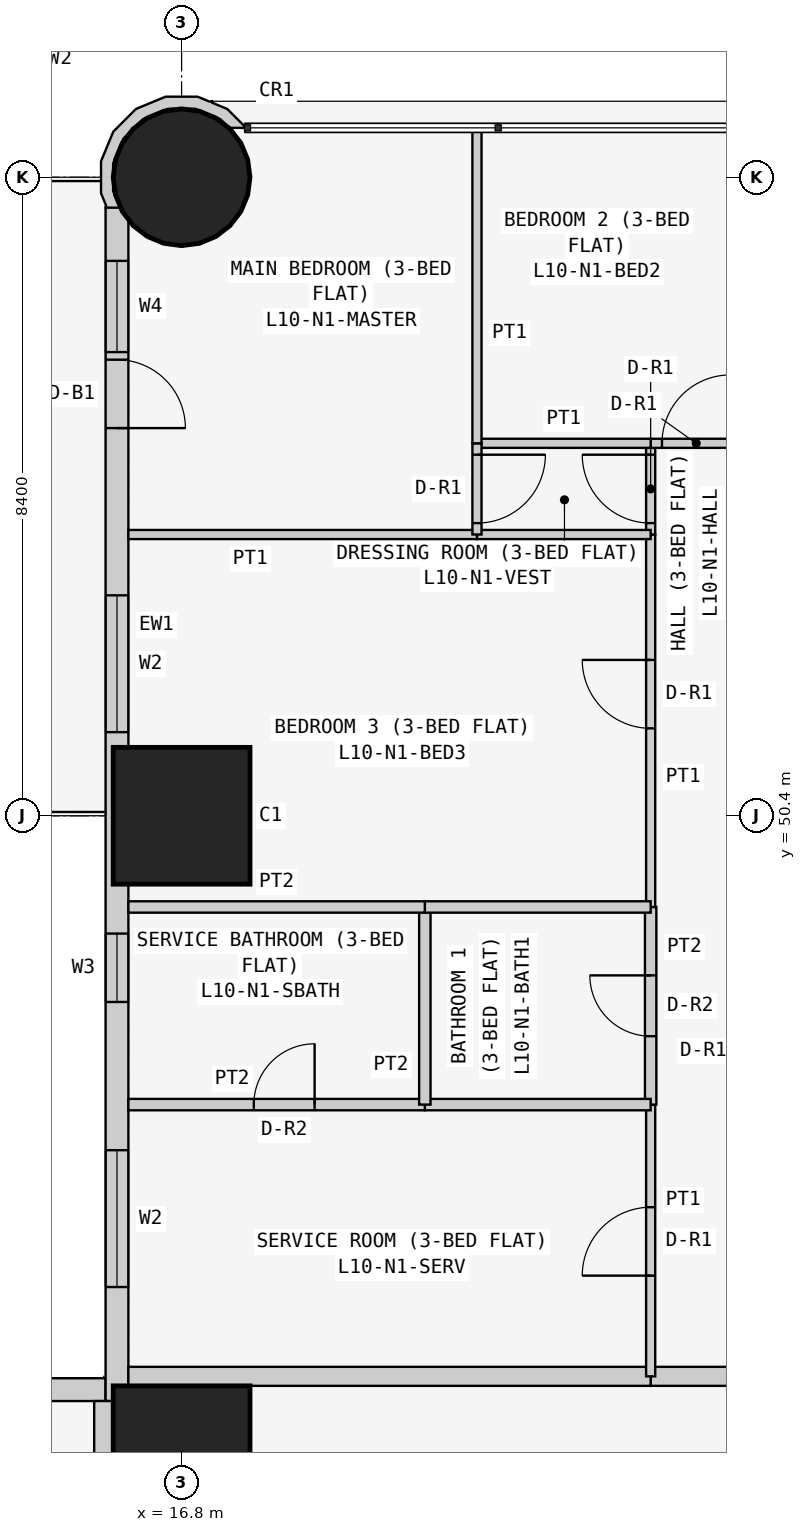
"""IFC4 building model, lengths in metres.
Left out: names, types, materials, properties, quantities, classifications, styles, units other than length and angle.
Written with IfcOpenShell. Run it as: python <this file> out.ifc"""

import sys

from ifc_helpers import new_model, si_unit, direction, frame, frame_2d, origin, origin_2d, place, context, subcontext, project, spatial, polyline, rectangle, circle, outline, extrude, element, fill, save


model = new_model("IFC4")
c1 = context("Model", 3, precision=1e-05, world=origin(), true_north=direction((0.0, 1.0)))
c2 = subcontext(c1, "Body", "Model", "MODEL_VIEW")
j1 = project(units=[si_unit("LENGTHUNIT", "METRE"), si_unit("PLANEANGLEUNIT", "RADIAN")], contexts=[c1])
p1 = place(None, origin())
s1 = spatial("IfcSite", under=j1, at=p1, CompositionType="ELEMENT")
p2 = place(p1, origin())
s2 = spatial("IfcBuilding", under=s1, at=p2, CompositionType="ELEMENT")
p3 = place(p2, frame((0.0, 0.0, 45.3)))
s3 = spatial("IfcBuildingStorey", under=s2, at=p3, CompositionType="ELEMENT", Elevation=45.3)
for number, where, z_axis, x_axis in (
    (1, (16.8, 42.0, 0.0), (0.0, 0.0, 1.0), (1.0, 0.0, 0.0)),
    (2, (16.8, 50.4, 0.0), (0.0, 0.0, 1.0), (1.0, 0.0, 0.0)),
):
    element("IfcColumn", number, at=place(p3, frame(where, z_axis=z_axis, x_axis=x_axis)), inside=s3, PredefinedType="COLUMN", context=c2, shape_type="SweptSolid", body=[
        extrude(rectangle(XDim=1.8, YDim=1.8, at=origin_2d()), origin(), (0.0, 0.0, 1.0), 3.6),
    ])
p4 = place(p3, frame((16.8, 58.8, 0.0), z_axis=(0.0, 0.0, 1.0), x_axis=(1.0, 0.0, 0.0)))
e3 = element("IfcColumn", 3, at=p4, inside=s3, PredefinedType="COLUMN", context=c2, shape_type="SweptSolid", body=[
    extrude(circle(Radius=0.9, at=origin_2d()), origin(), (0.0, 0.0, 1.0), 3.6),
])
p5 = place(p3, frame((15.8, 42.85, 0.0), z_axis=(0.0, 0.0, 1.0), x_axis=(-1.0, 0.0, 0.0)))
e4 = element("IfcWall", 4, at=p5, inside=s3, PredefinedType="SOLIDWALL", context=c2, shape_type="SweptSolid", body=[
    extrude(rectangle(XDim=15.4, YDim=0.3, at=frame_2d((7.7, 0.0))), origin(), (0.0, 0.0, 1.0), 3.45),
])
p6 = place(p5, frame((1.2, 0.0, 0.9)))
e5 = element("IfcOpeningElement", 5, at=p6, cuts=e4, PredefinedType="OPENING", context=c2, shape_type="SweptSolid", body=[
    extrude(rectangle(XDim=1.8, YDim=1.5, at=frame_2d((0.9, 0.75))), frame((0.0, 0.16, 0.0), z_axis=(0.0, -1.0, 0.0), x_axis=(1.0, 0.0, 0.0)), (0.0, 0.0, 1.0), 0.32),
])
p7 = place(p5, frame((4.95, 0.0, 1.5)))
e6 = element("IfcOpeningElement", 6, at=p7, cuts=e4, PredefinedType="OPENING", context=c2, shape_type="SweptSolid", body=[
    extrude(rectangle(XDim=0.9, YDim=0.7, at=frame_2d((0.45, 0.35))), frame((0.0, 0.16, 0.0), z_axis=(0.0, -1.0, 0.0), x_axis=(1.0, 0.0, 0.0)), (0.0, 0.0, 1.0), 0.32),
])
p8 = place(p5, frame((8.5, 0.0, 0.9)))
e7 = element("IfcOpeningElement", 7, at=p8, cuts=e4, PredefinedType="OPENING", context=c2, shape_type="SweptSolid", body=[
    extrude(rectangle(XDim=1.8, YDim=1.5, at=frame_2d((0.9, 0.75))), frame((0.0, 0.16, 0.0), z_axis=(0.0, -1.0, 0.0), x_axis=(1.0, 0.0, 0.0)), (0.0, 0.0, 1.0), 0.32),
])
p9 = place(p5, frame((12.5, 0.0, 0.0)))
e8 = element("IfcOpeningElement", 8, at=p9, cuts=e4, PredefinedType="OPENING", context=c2, shape_type="SweptSolid", body=[
    extrude(rectangle(XDim=0.9, YDim=2.4, at=frame_2d((0.45, 1.2))), frame((0.0, 0.16, 0.0), z_axis=(0.0, -1.0, 0.0), x_axis=(1.0, 0.0, 0.0)), (0.0, 0.0, 1.0), 0.32),
])
p10 = place(p5, frame((13.5, 0.0, 0.9)))
e9 = element("IfcOpeningElement", 9, at=p10, cuts=e4, PredefinedType="OPENING", context=c2, shape_type="SweptSolid", body=[
    extrude(rectangle(XDim=1.2, YDim=1.5, at=frame_2d((0.6, 0.75))), frame((0.0, 0.16, 0.0), z_axis=(0.0, -1.0, 0.0), x_axis=(1.0, 0.0, 0.0)), (0.0, 0.0, 1.0), 0.32),
])
p11 = place(p3, frame((15.95, 58.4, 0.0), z_axis=(0.0, 0.0, 1.0), x_axis=(0.0, -1.0, 0.0)))
e10 = element("IfcWall", 10, at=p11, inside=s3, PredefinedType="SOLIDWALL", context=c2, shape_type="SweptSolid", body=[
    extrude(rectangle(XDim=15.7, YDim=0.3, at=frame_2d((7.85, 0.0))), origin(), (0.0, 0.0, 1.0), 3.45),
])
p12 = place(p11, frame((12.4, 0.0, 0.9)))
e11 = element("IfcOpeningElement", 11, at=p12, cuts=e10, PredefinedType="OPENING", context=c2, shape_type="SweptSolid", body=[
    extrude(rectangle(XDim=1.8, YDim=1.5, at=frame_2d((0.9, 0.75))), frame((0.0, 0.16, 0.0), z_axis=(0.0, -1.0, 0.0), x_axis=(1.0, 0.0, 0.0)), (0.0, 0.0, 1.0), 0.32),
])
p13 = place(p11, frame((9.55, 0.0, 1.5)))
e12 = element("IfcOpeningElement", 12, at=p13, cuts=e10, PredefinedType="OPENING", context=c2, shape_type="SweptSolid", body=[
    extrude(rectangle(XDim=0.9, YDim=0.7, at=frame_2d((0.45, 0.35))), frame((0.0, 0.16, 0.0), z_axis=(0.0, -1.0, 0.0), x_axis=(1.0, 0.0, 0.0)), (0.0, 0.0, 1.0), 0.32),
])
p14 = place(p11, frame((5.1, 0.0, 0.9)))
e13 = element("IfcOpeningElement", 13, at=p14, cuts=e10, PredefinedType="OPENING", context=c2, shape_type="SweptSolid", body=[
    extrude(rectangle(XDim=1.8, YDim=1.5, at=frame_2d((0.9, 0.75))), frame((0.0, 0.16, 0.0), z_axis=(0.0, -1.0, 0.0), x_axis=(1.0, 0.0, 0.0)), (0.0, 0.0, 1.0), 0.32),
])
p15 = place(p11, frame((2.0, 0.0, 0.0)))
e14 = element("IfcOpeningElement", 14, at=p15, cuts=e10, PredefinedType="OPENING", context=c2, shape_type="SweptSolid", body=[
    extrude(rectangle(XDim=0.9, YDim=2.4, at=frame_2d((0.45, 1.2))), frame((0.0, 0.16, 0.0), z_axis=(0.0, -1.0, 0.0), x_axis=(1.0, 0.0, 0.0)), (0.0, 0.0, 1.0), 0.32),
])
p16 = place(p11, frame((0.7, 0.0, 0.9)))
e15 = element("IfcOpeningElement", 15, at=p16, cuts=e10, PredefinedType="OPENING", context=c2, shape_type="SweptSolid", body=[
    extrude(rectangle(XDim=1.2, YDim=1.5, at=frame_2d((0.6, 0.75))), frame((0.0, 0.16, 0.0), z_axis=(0.0, -1.0, 0.0), x_axis=(1.0, 0.0, 0.0)), (0.0, 0.0, 1.0), 0.32),
])
p17 = place(p3, frame((17.567, 59.411, 0.0), z_axis=(0.0, 0.0, 1.0), x_axis=(-0.377204953059, 0.926129809145, 0.0)))
e16 = element("IfcWall", 16, at=p17, inside=s3, PredefinedType="SOLIDWALL", context=c2, shape_type="SweptSolid", body=[
    extrude(outline(polyline([(-0.27, 2.017), (-0.37, 1.841), (-0.102, 1.842), (0.23, 1.707), (0.484, 1.455), (0.624, 1.125), (0.626, 0.766), (0.491, 0.434), (0.239, 0.18), (0.09, 0.117), (0.011, -0.078), (0.024, -0.083), (0.329, 0.045), (0.48, 0.198), (0.499, 0.193), (0.508, 0.225), (0.626, 0.345), (0.785, 0.736), (0.782, 1.157), (0.619, 1.546), (0.319, 1.842), (-0.072, 2.002), (-0.24, 2.0), (-0.27, 2.017)])), origin(), (0.0, 0.0, 1.0), 3.45),
])
p18 = place(p3, frame((22.971, 43.025, 0.0), z_axis=(0.0, 0.0, 1.0), x_axis=(1.0, 0.0, 0.0)))
e17 = element("IfcWall", 17, at=p18, inside=s3, PredefinedType="PARTITIONING", context=c2, shape_type="SweptSolid", body=[
    extrude(rectangle(XDim=1.2, YDim=0.25, at=frame_2d((0.6, 0.0))), origin(), (0.0, 0.0, 1.0), 3.45),
])
p19 = place(p3, frame((16.1, 43.025, 0.0), z_axis=(0.0, 0.0, 1.0), x_axis=(1.0, 0.0, 0.0)))
e18 = element("IfcWall", 18, at=p19, inside=s3, PredefinedType="PARTITIONING", context=c2, shape_type="SweptSolid", body=[
    extrude(rectangle(XDim=6.871, YDim=0.25, at=frame_2d((3.436, 0.0))), origin(), (0.0, 0.0, 1.0), 3.45),
])
p20 = place(p3, frame((15.775, 36.229, 0.0), z_axis=(0.0, 0.0, 1.0), x_axis=(0.0, 1.0, 0.0)))
e19 = element("IfcWall", 19, at=p20, inside=s3, PredefinedType="PARTITIONING", context=c2, shape_type="SweptSolid", body=[
    extrude(rectangle(XDim=6.471, YDim=0.25, at=frame_2d((3.235, 0.0))), origin(), (0.0, 0.0, 1.0), 3.45),
])
p21 = place(p3, frame((22.971, 46.6, 0.0), z_axis=(0.0, 0.0, 1.0), x_axis=(0.0, -1.0, 0.0)))
e20 = element("IfcWall", 20, at=p21, inside=s3, PredefinedType="PARTITIONING", context=c2, shape_type="SweptSolid", body=[
    extrude(rectangle(XDim=3.575, YDim=0.12, at=frame_2d((1.788, 0.0))), origin(), (0.0, 0.0, 1.0), 3.45),
])
p22 = place(p21, frame((1.35, 0.0, 0.0)))
e21 = element("IfcOpeningElement", 21, at=p22, cuts=e20, PredefinedType="OPENING", context=c2, shape_type="SweptSolid", body=[
    extrude(rectangle(XDim=0.9, YDim=2.1, at=frame_2d((0.45, 1.05))), frame((0.0, 0.07, 0.0), z_axis=(0.0, -1.0, 0.0), x_axis=(1.0, 0.0, 0.0)), (0.0, 0.0, 1.0), 0.14),
])
p23 = place(p3, frame((22.971, 49.2, 0.0), z_axis=(0.0, 0.0, 1.0), x_axis=(0.0, -1.0, 0.0)))
e22 = element("IfcWall", 22, at=p23, inside=s3, PredefinedType="PARTITIONING", context=c2, shape_type="SweptSolid", body=[
    extrude(rectangle(XDim=2.6, YDim=0.15, at=frame_2d((1.3, 0.0))), origin(), (0.0, 0.0, 1.0), 3.45),
])
p24 = place(p23, frame((0.9, 0.0, 0.0)))
e23 = element("IfcOpeningElement", 23, at=p24, cuts=e22, PredefinedType="OPENING", context=c2, shape_type="SweptSolid", body=[
    extrude(rectangle(XDim=0.8, YDim=2.1, at=frame_2d((0.4, 1.05))), frame((0.0, 0.085, 0.0), z_axis=(0.0, -1.0, 0.0), x_axis=(1.0, 0.0, 0.0)), (0.0, 0.0, 1.0), 0.17),
])
p25 = place(p3, frame((22.971, 54.1, 0.0), z_axis=(0.0, 0.0, 1.0), x_axis=(0.0, -1.0, 0.0)))
e24 = element("IfcWall", 24, at=p25, inside=s3, PredefinedType="PARTITIONING", context=c2, shape_type="SweptSolid", body=[
    extrude(rectangle(XDim=4.9, YDim=0.12, at=frame_2d((2.45, 0.0))), origin(), (0.0, 0.0, 1.0), 3.45),
])
p26 = place(p25, frame((1.65, 0.0, 0.0)))
e25 = element("IfcOpeningElement", 25, at=p26, cuts=e24, PredefinedType="OPENING", context=c2, shape_type="SweptSolid", body=[
    extrude(rectangle(XDim=0.9, YDim=2.1, at=frame_2d((0.45, 1.05))), frame((0.0, 0.07, 0.0), z_axis=(0.0, -1.0, 0.0), x_axis=(1.0, 0.0, 0.0)), (0.0, 0.0, 1.0), 0.14),
])
p27 = place(p3, frame((22.971, 55.3, 0.0), z_axis=(0.0, 0.0, 1.0), x_axis=(0.0, -1.0, 0.0)))
e26 = element("IfcWall", 26, at=p27, inside=s3, PredefinedType="PARTITIONING", context=c2, shape_type="SweptSolid", body=[
    extrude(rectangle(XDim=1.2, YDim=0.12, at=frame_2d((0.6, 0.0))), origin(), (0.0, 0.0, 1.0), 3.45),
])
p28 = place(p27, frame((0.15, 0.0, 0.0)))
e27 = element("IfcOpeningElement", 27, at=p28, cuts=e26, PredefinedType="OPENING", context=c2, shape_type="SweptSolid", body=[
    extrude(rectangle(XDim=0.9, YDim=2.1, at=frame_2d((0.45, 1.05))), frame((0.0, 0.07, 0.0), z_axis=(0.0, -1.0, 0.0), x_axis=(1.0, 0.0, 0.0)), (0.0, 0.0, 1.0), 0.14),
])
p29 = place(p3, frame((24.171, 55.3, 0.0), z_axis=(0.0, 0.0, 1.0), x_axis=(-1.0, 0.0, 0.0)))
e28 = element("IfcWall", 28, at=p29, inside=s3, PredefinedType="PARTITIONING", context=c2, shape_type="SweptSolid", body=[
    extrude(rectangle(XDim=1.2, YDim=0.12, at=frame_2d((0.6, 0.0))), origin(), (0.0, 0.0, 1.0), 3.45),
])
p30 = place(p29, frame((0.151, 0.0, 0.0)))
e29 = element("IfcOpeningElement", 29, at=p30, cuts=e28, PredefinedType="OPENING", context=c2, shape_type="SweptSolid", body=[
    extrude(rectangle(XDim=0.9, YDim=2.1, at=frame_2d((0.45, 1.05))), frame((0.0, 0.07, 0.0), z_axis=(0.0, -1.0, 0.0), x_axis=(1.0, 0.0, 0.0)), (0.0, 0.0, 1.0), 0.14),
])
p31 = place(p3, frame((22.971, 46.6, 0.0), z_axis=(0.0, 0.0, 1.0), x_axis=(-1.0, 0.0, 0.0)))
e30 = element("IfcWall", 30, at=p31, inside=s3, PredefinedType="PARTITIONING", context=c2, shape_type="SweptSolid", body=[
    extrude(rectangle(XDim=2.971, YDim=0.15, at=frame_2d((1.485, 0.0))), origin(), (0.0, 0.0, 1.0), 3.45),
])
p32 = place(p3, frame((20.0, 46.6, 0.0), z_axis=(0.0, 0.0, 1.0), x_axis=(-1.0, 0.0, 0.0)))
e31 = element("IfcWall", 31, at=p32, inside=s3, PredefinedType="PARTITIONING", context=c2, shape_type="SweptSolid", body=[
    extrude(rectangle(XDim=3.9, YDim=0.15, at=frame_2d((1.95, 0.0))), origin(), (0.0, 0.0, 1.0), 3.45),
])
p33 = place(p32, frame((1.45, 0.0, 0.0)))
e32 = element("IfcOpeningElement", 32, at=p33, cuts=e31, PredefinedType="OPENING", context=c2, shape_type="SweptSolid", body=[
    extrude(rectangle(XDim=0.8, YDim=2.1, at=frame_2d((0.4, 1.05))), frame((0.0, 0.085, 0.0), z_axis=(0.0, -1.0, 0.0), x_axis=(1.0, 0.0, 0.0)), (0.0, 0.0, 1.0), 0.17),
])
p34 = place(p3, frame((20.0, 49.2, 0.0), z_axis=(0.0, 0.0, 1.0), x_axis=(0.0, -1.0, 0.0)))
e33 = element("IfcWall", 33, at=p34, inside=s3, PredefinedType="PARTITIONING", context=c2, shape_type="SweptSolid", body=[
    extrude(rectangle(XDim=2.6, YDim=0.15, at=frame_2d((1.3, 0.0))), origin(), (0.0, 0.0, 1.0), 3.45),
])
p35 = place(p3, frame((22.971, 49.2, 0.0), z_axis=(0.0, 0.0, 1.0), x_axis=(-1.0, 0.0, 0.0)))
e34 = element("IfcWall", 34, at=p35, inside=s3, PredefinedType="PARTITIONING", context=c2, shape_type="SweptSolid", body=[
    extrude(rectangle(XDim=2.971, YDim=0.15, at=frame_2d((1.485, 0.0))), origin(), (0.0, 0.0, 1.0), 3.45),
])
p36 = place(p3, frame((20.0, 49.2, 0.0), z_axis=(0.0, 0.0, 1.0), x_axis=(-1.0, 0.0, 0.0)))
e35 = element("IfcWall", 35, at=p36, inside=s3, PredefinedType="PARTITIONING", context=c2, shape_type="SweptSolid", body=[
    extrude(rectangle(XDim=3.9, YDim=0.15, at=frame_2d((1.95, 0.0))), origin(), (0.0, 0.0, 1.0), 3.45),
])
p37 = place(p3, frame((22.971, 54.1, 0.0), z_axis=(0.0, 0.0, 1.0), x_axis=(-1.0, 0.0, 0.0)))
e36 = element("IfcWall", 36, at=p37, inside=s3, PredefinedType="PARTITIONING", context=c2, shape_type="SweptSolid", body=[
    extrude(rectangle(XDim=2.285, YDim=0.12, at=frame_2d((1.143, 0.0))), origin(), (0.0, 0.0, 1.0), 3.45),
])
p38 = place(p3, frame((20.686, 54.1, 0.0), z_axis=(0.0, 0.0, 1.0), x_axis=(-1.0, 0.0, 0.0)))
e37 = element("IfcWall", 37, at=p38, inside=s3, PredefinedType="PARTITIONING", context=c2, shape_type="SweptSolid", body=[
    extrude(rectangle(XDim=4.586, YDim=0.12, at=frame_2d((2.293, 0.0))), origin(), (0.0, 0.0, 1.0), 3.45),
])
p39 = place(p3, frame((22.971, 55.3, 0.0), z_axis=(0.0, 0.0, 1.0), x_axis=(-1.0, 0.0, 0.0)))
e38 = element("IfcWall", 38, at=p39, inside=s3, PredefinedType="PARTITIONING", context=c2, shape_type="SweptSolid", body=[
    extrude(rectangle(XDim=2.285, YDim=0.12, at=frame_2d((1.143, 0.0))), origin(), (0.0, 0.0, 1.0), 3.45),
])
p40 = place(p3, frame((20.686, 55.3, 0.0), z_axis=(0.0, 0.0, 1.0), x_axis=(0.0, -1.0, 0.0)))
e39 = element("IfcWall", 39, at=p40, inside=s3, PredefinedType="PARTITIONING", context=c2, shape_type="SweptSolid", body=[
    extrude(rectangle(XDim=1.2, YDim=0.12, at=frame_2d((0.6, 0.0))), origin(), (0.0, 0.0, 1.0), 3.45),
])
p41 = place(p40, frame((0.15, 0.0, 0.0)))
e40 = element("IfcOpeningElement", 40, at=p41, cuts=e39, PredefinedType="OPENING", context=c2, shape_type="SweptSolid", body=[
    extrude(rectangle(XDim=0.9, YDim=2.1, at=frame_2d((0.45, 1.05))), frame((0.0, 0.07, 0.0), z_axis=(0.0, -1.0, 0.0), x_axis=(1.0, 0.0, 0.0)), (0.0, 0.0, 1.0), 0.14),
])
p42 = place(p3, frame((20.686, 59.45, 0.0), z_axis=(0.0, 0.0, 1.0), x_axis=(0.0, -1.0, 0.0)))
e41 = element("IfcWall", 41, at=p42, inside=s3, PredefinedType="PARTITIONING", context=c2, shape_type="SweptSolid", body=[
    extrude(rectangle(XDim=4.15, YDim=0.12, at=frame_2d((2.075, 0.0))), origin(), (0.0, 0.0, 1.0), 3.45),
])
p43 = place(p12, origin())
e42 = element("IfcWindow", 42, at=p43, inside=s3, PartitioningType="SINGLE_PANEL", PredefinedType="WINDOW", context=c2, shape_type="SweptSolid", body=[
    extrude(rectangle(XDim=1.8, YDim=1.5, at=frame_2d((0.9, 0.75))), frame((0.0, 0.03, 0.0), z_axis=(0.0, -1.0, 0.0), x_axis=(1.0, 0.0, 0.0)), (0.0, 0.0, 1.0), 0.06),
])
fill(e11, e42)
p44 = place(p13, origin())
e43 = element("IfcWindow", 43, at=p44, inside=s3, PartitioningType="SINGLE_PANEL", PredefinedType="WINDOW", context=c2, shape_type="SweptSolid", body=[
    extrude(rectangle(XDim=0.9, YDim=0.7, at=frame_2d((0.45, 0.35))), frame((0.0, 0.03, 0.0), z_axis=(0.0, -1.0, 0.0), x_axis=(1.0, 0.0, 0.0)), (0.0, 0.0, 1.0), 0.06),
])
fill(e12, e43)
p45 = place(p14, origin())
e44 = element("IfcWindow", 44, at=p45, inside=s3, PartitioningType="SINGLE_PANEL", PredefinedType="WINDOW", context=c2, shape_type="SweptSolid", body=[
    extrude(rectangle(XDim=1.8, YDim=1.5, at=frame_2d((0.9, 0.75))), frame((0.0, 0.03, 0.0), z_axis=(0.0, -1.0, 0.0), x_axis=(1.0, 0.0, 0.0)), (0.0, 0.0, 1.0), 0.06),
])
fill(e13, e44)
p46 = place(p15, origin())
e45 = element("IfcDoor", 45, at=p46, inside=s3, OperationType="SINGLE_SWING_RIGHT", PredefinedType="DOOR", context=c2, shape_type="SweptSolid", body=[
    extrude(rectangle(XDim=0.9, YDim=2.4, at=frame_2d((0.45, 1.2))), frame((0.0, 0.025, 0.0), z_axis=(0.0, -1.0, 0.0), x_axis=(1.0, 0.0, 0.0)), (0.0, 0.0, 1.0), 0.05),
])
fill(e14, e45)
p47 = place(p16, origin())
e46 = element("IfcWindow", 46, at=p47, inside=s3, PartitioningType="SINGLE_PANEL", PredefinedType="WINDOW", context=c2, shape_type="SweptSolid", body=[
    extrude(rectangle(XDim=1.2, YDim=1.5, at=frame_2d((0.6, 0.75))), frame((0.0, 0.03, 0.0), z_axis=(0.0, -1.0, 0.0), x_axis=(1.0, 0.0, 0.0)), (0.0, 0.0, 1.0), 0.06),
])
fill(e15, e46)
p48 = place(p22, frame((0.9, 0.0, 0.0), z_axis=(0.0, 0.0, 1.0), x_axis=(-1.0, 0.0, 0.0)))
e47 = element("IfcDoor", 47, at=p48, inside=s3, OperationType="SINGLE_SWING_LEFT", PredefinedType="DOOR", context=c2, shape_type="SweptSolid", body=[
    extrude(rectangle(XDim=0.9, YDim=2.1, at=frame_2d((0.45, 1.05))), frame((0.0, 0.025, 0.0), z_axis=(0.0, -1.0, 0.0), x_axis=(1.0, 0.0, 0.0)), (0.0, 0.0, 1.0), 0.05),
])
fill(e21, e47)
p49 = place(p33, frame((0.8, 0.0, 0.0), z_axis=(0.0, 0.0, 1.0), x_axis=(-1.0, 0.0, 0.0)))
e48 = element("IfcDoor", 48, at=p49, inside=s3, OperationType="SINGLE_SWING_RIGHT", PredefinedType="DOOR", context=c2, shape_type="SweptSolid", body=[
    extrude(rectangle(XDim=0.8, YDim=2.1, at=frame_2d((0.4, 1.05))), frame((0.0, 0.025, 0.0), z_axis=(0.0, -1.0, 0.0), x_axis=(1.0, 0.0, 0.0)), (0.0, 0.0, 1.0), 0.05),
])
fill(e32, e48)
p50 = place(p24, frame((0.8, 0.0, 0.0), z_axis=(0.0, 0.0, 1.0), x_axis=(-1.0, 0.0, 0.0)))
e49 = element("IfcDoor", 49, at=p50, inside=s3, OperationType="SINGLE_SWING_RIGHT", PredefinedType="DOOR", context=c2, shape_type="SweptSolid", body=[
    extrude(rectangle(XDim=0.8, YDim=2.1, at=frame_2d((0.4, 1.05))), frame((0.0, 0.025, 0.0), z_axis=(0.0, -1.0, 0.0), x_axis=(1.0, 0.0, 0.0)), (0.0, 0.0, 1.0), 0.05),
])
fill(e23, e49)
p51 = place(p26, frame((0.9, 0.0, 0.0), z_axis=(0.0, 0.0, 1.0), x_axis=(-1.0, 0.0, 0.0)))
e50 = element("IfcDoor", 50, at=p51, inside=s3, OperationType="SINGLE_SWING_RIGHT", PredefinedType="DOOR", context=c2, shape_type="SweptSolid", body=[
    extrude(rectangle(XDim=0.9, YDim=2.1, at=frame_2d((0.45, 1.05))), frame((0.0, 0.025, 0.0), z_axis=(0.0, -1.0, 0.0), x_axis=(1.0, 0.0, 0.0)), (0.0, 0.0, 1.0), 0.05),
])
fill(e25, e50)
p52 = place(p28, frame((0.9, 0.0, 0.0), z_axis=(0.0, 0.0, 1.0), x_axis=(-1.0, 0.0, 0.0)))
e51 = element("IfcDoor", 51, at=p52, inside=s3, OperationType="SINGLE_SWING_RIGHT", PredefinedType="DOOR", context=c2, shape_type="SweptSolid", body=[
    extrude(rectangle(XDim=0.9, YDim=2.1, at=frame_2d((0.45, 1.05))), frame((0.0, 0.025, 0.0), z_axis=(0.0, -1.0, 0.0), x_axis=(1.0, 0.0, 0.0)), (0.0, 0.0, 1.0), 0.05),
])
fill(e27, e51)
p53 = place(p41, origin())
e52 = element("IfcDoor", 52, at=p53, inside=s3, OperationType="SINGLE_SWING_LEFT", PredefinedType="DOOR", context=c2, shape_type="SweptSolid", body=[
    extrude(rectangle(XDim=0.9, YDim=2.1, at=frame_2d((0.45, 1.05))), frame((0.0, 0.025, 0.0), z_axis=(0.0, -1.0, 0.0), x_axis=(1.0, 0.0, 0.0)), (0.0, 0.0, 1.0), 0.05),
])
fill(e40, e52)
p54 = place(p30, frame((0.9, 0.0, 0.0), z_axis=(0.0, 0.0, 1.0), x_axis=(-1.0, 0.0, 0.0)))
e53 = element("IfcDoor", 53, at=p54, inside=s3, OperationType="SINGLE_SWING_RIGHT", PredefinedType="DOOR", context=c2, shape_type="SweptSolid", body=[
    extrude(rectangle(XDim=0.9, YDim=2.1, at=frame_2d((0.45, 1.05))), frame((0.0, 0.025, 0.0), z_axis=(0.0, -1.0, 0.0), x_axis=(1.0, 0.0, 0.0)), (0.0, 0.0, 1.0), 0.05),
])
fill(e29, e53)
save(model, sys.argv[1])
